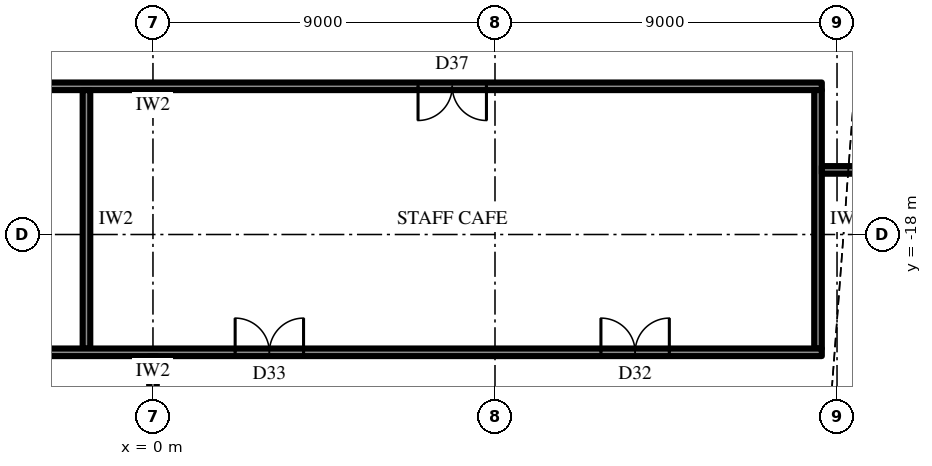
"""IFC4 building model, lengths in metres.
Left out: names, types, materials, properties, quantities, classifications, styles, units other than length and angle.
Written with IfcOpenShell. Run it as: python <this file> out.ifc"""

import sys

from ifc_helpers import new_model, si_unit, direction, frame, frame_2d, origin, place, context, subcontext, project, spatial, rectangle, extrude, element, fill, save


model = new_model("IFC4")
c1 = context("Model", 3, precision=1e-05, world=origin(), true_north=direction((0.0, 1.0)))
c2 = subcontext(c1, "Body", "Model", "MODEL_VIEW")
j1 = project(units=[si_unit("LENGTHUNIT", "METRE"), si_unit("PLANEANGLEUNIT", "RADIAN")], contexts=[c1])
p1 = place(None, origin())
s1 = spatial("IfcSite", under=j1, at=p1, CompositionType="ELEMENT")
p2 = place(p1, origin())
s2 = spatial("IfcBuilding", under=s1, at=p2, CompositionType="ELEMENT")
p3 = place(p2, frame((0.0, 0.0, 114.5)))
s3 = spatial("IfcBuildingStorey", under=s2, at=p3, CompositionType="ELEMENT", Elevation=114.5)
p4 = place(p3, frame((17.6, -14.1, 0.0), z_axis=(0.0, 0.0, 1.0), x_axis=(-1.0, 0.0, 0.0)))
e1 = element("IfcWall", 1, at=p4, inside=s3, PredefinedType="PARTITIONING", context=c2, shape_type="SweptSolid", body=[
    extrude(rectangle(XDim=35.2, YDim=0.2, at=frame_2d((17.6, 0.0))), origin(), (0.0, 0.0, 1.0), 4.8),
])
p5 = place(p4, frame((8.825, 0.0, 0.0)))
e2 = element("IfcOpeningElement", 2, at=p5, cuts=e1, PredefinedType="OPENING", context=c2, shape_type="SweptSolid", body=[
    extrude(rectangle(XDim=1.8, YDim=2.4, at=frame_2d((0.9, 1.2))), frame((0.0, 0.11, 0.0), z_axis=(0.0, -1.0, 0.0), x_axis=(1.0, 0.0, 0.0)), (0.0, 0.0, 1.0), 0.22),
])
p6 = place(p4, frame((26.725, 0.0, 0.0)))
e3 = element("IfcOpeningElement", 3, at=p6, cuts=e1, PredefinedType="OPENING", context=c2, shape_type="SweptSolid", body=[
    extrude(rectangle(XDim=1.0, YDim=2.2, at=frame_2d((0.5, 1.1))), frame((0.0, 0.11, 0.0), z_axis=(0.0, -1.0, 0.0), x_axis=(1.0, 0.0, 0.0)), (0.0, 0.0, 1.0), 0.22),
])
for number, where, z_axis, x_axis in (
    (4, (17.5, -14.2, 0.0), (0.0, 0.0, 1.0), (0.0, -1.0, 0.0)),
    (5, (-1.75, -14.2, 0.0), (0.0, 0.0, 1.0), (0.0, -1.0, 0.0)),
):
    element("IfcWall", number, at=place(p3, frame(where, z_axis=z_axis, x_axis=x_axis)), inside=s3, PredefinedType="PARTITIONING", context=c2, shape_type="SweptSolid", body=[
        extrude(rectangle(XDim=6.8, YDim=0.2, at=frame_2d((3.4, 0.0))), origin(), (0.0, 0.0, 1.0), 4.8),
    ])
p7 = place(p3, frame((17.6, -21.1, 0.0), z_axis=(0.0, 0.0, 1.0), x_axis=(-1.0, 0.0, 0.0)))
e6 = element("IfcWall", 6, at=p7, inside=s3, PredefinedType="PARTITIONING", context=c2, shape_type="SweptSolid", body=[
    extrude(rectangle(XDim=35.2, YDim=0.2, at=frame_2d((17.6, 0.0))), origin(), (0.0, 0.0, 1.0), 4.8),
])
p8 = place(p7, frame((4.012, 0.0, 0.0)))
e7 = element("IfcOpeningElement", 7, at=p8, cuts=e6, PredefinedType="OPENING", context=c2, shape_type="SweptSolid", body=[
    extrude(rectangle(XDim=1.8, YDim=2.4, at=frame_2d((0.9, 1.2))), frame((0.0, 0.11, 0.0), z_axis=(0.0, -1.0, 0.0), x_axis=(1.0, 0.0, 0.0)), (0.0, 0.0, 1.0), 0.22),
])
p9 = place(p7, frame((13.637, 0.0, 0.0)))
e8 = element("IfcOpeningElement", 8, at=p9, cuts=e6, PredefinedType="OPENING", context=c2, shape_type="SweptSolid", body=[
    extrude(rectangle(XDim=1.8, YDim=2.4, at=frame_2d((0.9, 1.2))), frame((0.0, 0.11, 0.0), z_axis=(0.0, -1.0, 0.0), x_axis=(1.0, 0.0, 0.0)), (0.0, 0.0, 1.0), 0.22),
])
p10 = place(p7, frame((26.725, 0.0, 0.0)))
e9 = element("IfcOpeningElement", 9, at=p10, cuts=e6, PredefinedType="OPENING", context=c2, shape_type="SweptSolid", body=[
    extrude(rectangle(XDim=1.0, YDim=2.2, at=frame_2d((0.5, 1.1))), frame((0.0, 0.11, 0.0), z_axis=(0.0, -1.0, 0.0), x_axis=(1.0, 0.0, 0.0)), (0.0, 0.0, 1.0), 0.22),
])
p11 = place(p3, frame((17.6, -16.3, 0.0), z_axis=(0.0, 0.0, 1.0), x_axis=(1.0, 0.0, 0.0)))
e10 = element("IfcWall", 10, at=p11, inside=s3, PredefinedType="PARTITIONING", context=c2, shape_type="SweptSolid", body=[
    extrude(rectangle(XDim=4.9, YDim=0.2, at=frame_2d((2.45, 0.0))), origin(), (0.0, 0.0, 1.0), 4.8),
])
p12 = place(p3, frame((0.0, -21.2, 0.0), z_axis=(0.0, 0.0, 1.0), x_axis=(0.0, -1.0, 0.0)))
e11 = element("IfcWall", 11, at=p12, inside=s3, PredefinedType="PARTITIONING", context=c2, shape_type="SweptSolid", body=[
    extrude(rectangle(XDim=10.11, YDim=0.2, at=frame_2d((5.055, 0.0))), origin(), (0.0, 0.0, 1.0), 3.792),
])
p13 = place(p8, frame((1.8, 0.0, 0.0), z_axis=(0.0, 0.0, 1.0), x_axis=(-1.0, 0.0, 0.0)))
e12 = element("IfcDoor", 12, at=p13, inside=s3, OperationType="DOUBLE_DOOR_SINGLE_SWING", PredefinedType="DOOR", context=c2, shape_type="SweptSolid", body=[
    extrude(rectangle(XDim=1.8, YDim=2.4, at=frame_2d((0.9, 1.2))), frame((0.0, 0.025, 0.0), z_axis=(0.0, -1.0, 0.0), x_axis=(1.0, 0.0, 0.0)), (0.0, 0.0, 1.0), 0.05),
])
fill(e7, e12)
p14 = place(p9, frame((1.8, 0.0, 0.0), z_axis=(0.0, 0.0, 1.0), x_axis=(-1.0, 0.0, 0.0)))
e13 = element("IfcDoor", 13, at=p14, inside=s3, OperationType="DOUBLE_DOOR_SINGLE_SWING", PredefinedType="DOOR", context=c2, shape_type="SweptSolid", body=[
    extrude(rectangle(XDim=1.8, YDim=2.4, at=frame_2d((0.9, 1.2))), frame((0.0, 0.025, 0.0), z_axis=(0.0, -1.0, 0.0), x_axis=(1.0, 0.0, 0.0)), (0.0, 0.0, 1.0), 0.05),
])
fill(e8, e13)
p15 = place(p5, origin())
e14 = element("IfcDoor", 14, at=p15, inside=s3, OperationType="DOUBLE_DOOR_SINGLE_SWING", PredefinedType="DOOR", context=c2, shape_type="SweptSolid", body=[
    extrude(rectangle(XDim=1.8, YDim=2.4, at=frame_2d((0.9, 1.2))), frame((0.0, 0.025, 0.0), z_axis=(0.0, -1.0, 0.0), x_axis=(1.0, 0.0, 0.0)), (0.0, 0.0, 1.0), 0.05),
])
fill(e2, e14)
save(model, sys.argv[1])
